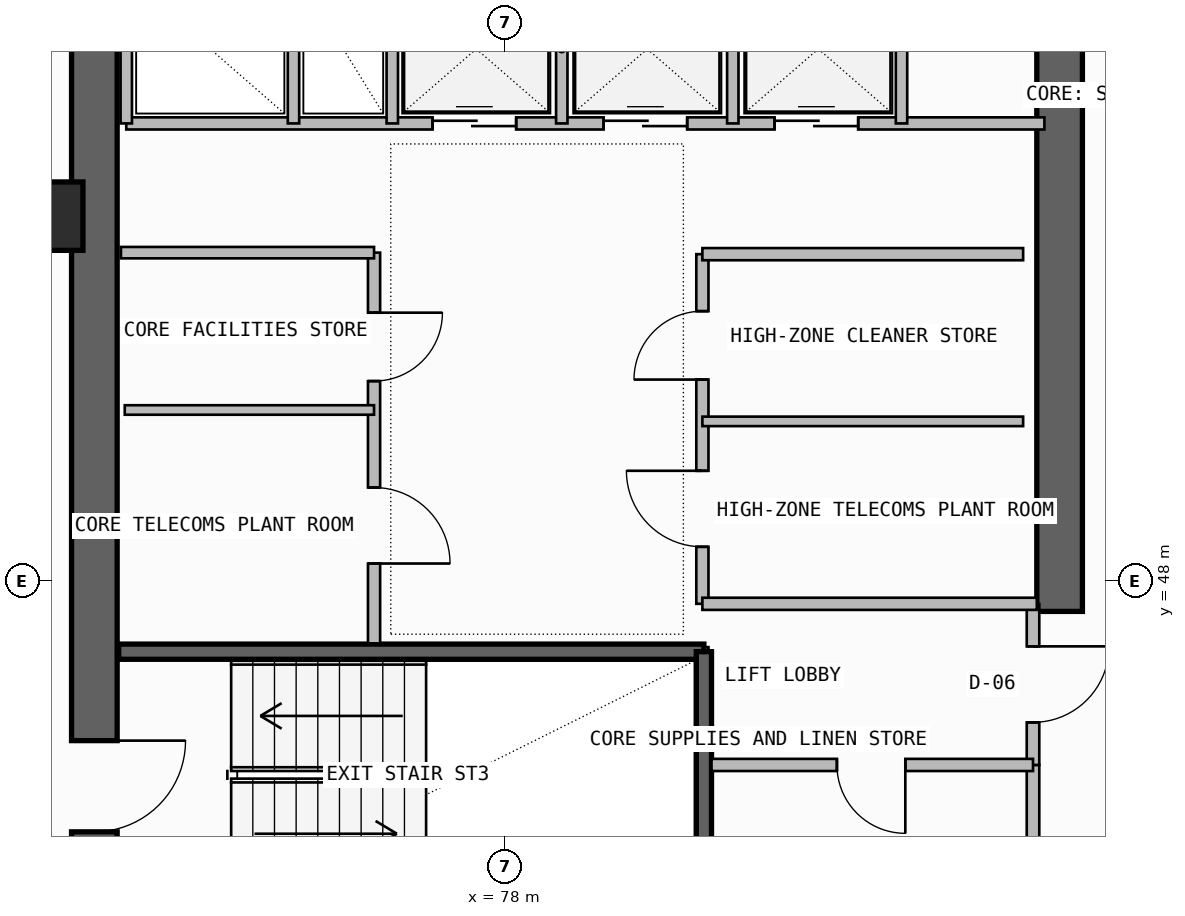
"""IFC4 building model, lengths in metres.
Left out: names, types, materials, properties, quantities, classifications, styles, units other than length and angle.
Written with IfcOpenShell. Run it as: python <this file> out.ifc"""

import sys

from ifc_helpers import new_model, si_unit, direction, frame, frame_2d, origin, origin_2d, place, context, subcontext, project, spatial, rectangle, extrude, element, fill, save


model = new_model("IFC4")
c1 = context("Model", 3, precision=1e-05, world=origin(), true_north=direction((0.0, 1.0)))
c2 = subcontext(c1, "Body", "Model", "MODEL_VIEW")
j1 = project(units=[si_unit("LENGTHUNIT", "METRE"), si_unit("PLANEANGLEUNIT", "RADIAN")], contexts=[c1])
p1 = place(None, origin())
s1 = spatial("IfcSite", under=j1, at=p1, CompositionType="ELEMENT")
p2 = place(p1, origin())
s2 = spatial("IfcBuilding", under=s1, at=p2, CompositionType="ELEMENT")
p3 = place(p2, frame((0.0, 0.0, 243.14)))
s3 = spatial("IfcBuildingStorey", under=s2, at=p3, CompositionType="ELEMENT", Elevation=243.14)
p4 = place(p3, frame((72.6, 43.35, -0.26), z_axis=(0.0, 0.0, 1.0), x_axis=(0.0, 1.0, 0.0)))
e1 = element("IfcWall", 1, at=p4, inside=s3, PredefinedType="SHEAR", context=c2, shape_type="SweptSolid", body=[
    extrude(rectangle(XDim=12.7, YDim=0.6, at=frame_2d((6.35, 0.0))), origin(), (0.0, 0.0, 1.0), 3.52),
])
p5 = place(p4, frame((1.35, 0.0, 0.26)))
e2 = element("IfcOpeningElement", 2, at=p5, cuts=e1, PredefinedType="OPENING", context=c2, shape_type="SweptSolid", body=[
    extrude(rectangle(XDim=1.2, YDim=2.2, at=frame_2d((0.6, 1.1))), frame((0.0, 0.31, 0.0), z_axis=(0.0, -1.0, 0.0), x_axis=(1.0, 0.0, 0.0)), (0.0, 0.0, 1.0), 0.62),
])
p6 = place(p3, frame((85.3, 47.6, -0.26), z_axis=(0.0, 0.0, 1.0), x_axis=(0.0, 1.0, 0.0)))
e3 = element("IfcWall", 3, at=p6, inside=s3, PredefinedType="SHEAR", context=c2, shape_type="SweptSolid", body=[
    extrude(rectangle(XDim=8.45, YDim=0.6, at=frame_2d((4.225, 0.0))), origin(), (0.0, 0.0, 1.0), 3.52),
])
p7 = place(p3, frame((72.0, 52.8, 0.0), z_axis=(0.0, 0.0, 1.0), x_axis=(1.0, 0.0, 0.0)))
e4 = element("IfcColumn", 4, at=p7, inside=s3, PredefinedType="COLUMN", context=c2, shape_type="SweptSolid", body=[
    extrude(rectangle(XDim=0.9, YDim=0.9, at=origin_2d()), origin(), (0.0, 0.0, 1.0), 3.52),
])
p8 = place(p3, frame((72.92, 47.07, -0.26), z_axis=(0.0, 0.0, 1.0), x_axis=(1.0, 0.0, 0.0)))
e5 = element("IfcWall", 5, at=p8, inside=s3, PredefinedType="SOLIDWALL", context=c2, shape_type="SweptSolid", body=[
    extrude(rectangle(XDim=7.7, YDim=0.2, at=frame_2d((3.85, 0.0))), origin(), (0.0, 0.0, 1.0), 3.52),
])
p9 = place(p3, frame((80.62, 43.83, -0.26), z_axis=(0.0, 0.0, 1.0), x_axis=(0.0, 1.0, 0.0)))
e6 = element("IfcWall", 6, at=p9, inside=s3, PredefinedType="SOLIDWALL", context=c2, shape_type="SweptSolid", body=[
    extrude(rectangle(XDim=3.24, YDim=0.2, at=frame_2d((1.62, 0.0))), origin(), (0.0, 0.0, 1.0), 3.52),
])
p10 = place(p3, frame((84.95, 43.68, 0.0), z_axis=(0.0, 0.0, 1.0), x_axis=(0.0, 1.0, 0.0)))
e7 = element("IfcWall", 7, at=p10, inside=s3, PredefinedType="PLUMBINGWALL", context=c2, shape_type="SweptSolid", body=[
    extrude(rectangle(XDim=1.9, YDim=0.165, at=frame_2d((0.95, 0.0))), origin(), (0.0, 0.0, 1.0), 3.26),
])
p11 = place(p3, frame((84.95, 45.58, 0.0), z_axis=(0.0, 0.0, 1.0), x_axis=(0.0, 1.0, 0.0)))
e8 = element("IfcWall", 8, at=p11, inside=s3, PredefinedType="PARTITIONING", context=c2, shape_type="SweptSolid", body=[
    extrude(rectangle(XDim=2.12, YDim=0.165, at=frame_2d((1.06, 0.0))), origin(), (0.0, 0.0, 1.0), 3.26),
])
p12 = place(p11, frame((0.56, 0.0, 0.0)))
e9 = element("IfcOpeningElement", 9, at=p12, cuts=e8, PredefinedType="OPENING", context=c2, shape_type="SweptSolid", body=[
    extrude(rectangle(XDim=1.0, YDim=2.2, at=frame_2d((0.5, 1.1))), frame((0.0, 0.093, 0.0), z_axis=(0.0, -1.0, 0.0), x_axis=(1.0, 0.0, 0.0)), (0.0, 0.0, 1.0), 0.185),
])
p13 = place(p3, frame((80.72, 45.58, 0.0), z_axis=(0.0, 0.0, 1.0), x_axis=(1.0, 0.0, 0.0)))
e10 = element("IfcWall", 10, at=p13, inside=s3, PredefinedType="PLUMBINGWALL", context=c2, shape_type="SweptSolid", body=[
    extrude(rectangle(XDim=4.23, YDim=0.16, at=frame_2d((2.115, 0.0))), origin(), (0.0, 0.0, 1.0), 3.26),
])
p14 = place(p13, frame((1.65, 0.0, 0.0)))
e11 = element("IfcOpeningElement", 11, at=p14, cuts=e10, PredefinedType="OPENING", context=c2, shape_type="SweptSolid", body=[
    extrude(rectangle(XDim=0.9, YDim=2.1, at=frame_2d((0.45, 1.05))), frame((0.0, 0.09, 0.0), z_axis=(0.0, -1.0, 0.0), x_axis=(1.0, 0.0, 0.0)), (0.0, 0.0, 1.0), 0.18),
])
p15 = place(p3, frame((76.28, 47.18, 0.0), z_axis=(0.0, 0.0, 1.0), x_axis=(0.0, 1.0, 0.0)))
e12 = element("IfcWall", 12, at=p15, inside=s3, PredefinedType="SOLIDWALL", context=c2, shape_type="SweptSolid", body=[
    extrude(rectangle(XDim=5.14, YDim=0.16, at=frame_2d((2.57, 0.0))), origin(), (0.0, 0.0, 1.0), 3.26),
])
p16 = place(p15, frame((1.05, 0.0, 0.0)))
e13 = element("IfcOpeningElement", 13, at=p16, cuts=e12, PredefinedType="OPENING", context=c2, shape_type="SweptSolid", body=[
    extrude(rectangle(XDim=1.0, YDim=2.2, at=frame_2d((0.5, 1.1))), frame((0.0, 0.09, 0.0), z_axis=(0.0, -1.0, 0.0), x_axis=(1.0, 0.0, 0.0)), (0.0, 0.0, 1.0), 0.18),
])
p17 = place(p15, frame((3.45, 0.0, 0.0)))
e14 = element("IfcOpeningElement", 14, at=p17, cuts=e12, PredefinedType="OPENING", context=c2, shape_type="SweptSolid", body=[
    extrude(rectangle(XDim=0.9, YDim=2.1, at=frame_2d((0.45, 1.05))), frame((0.0, 0.09, 0.0), z_axis=(0.0, -1.0, 0.0), x_axis=(1.0, 0.0, 0.0)), (0.0, 0.0, 1.0), 0.18),
])
p18 = place(p3, frame((72.95, 52.32, 0.0), z_axis=(0.0, 0.0, 1.0), x_axis=(1.0, 0.0, 0.0)))
e15 = element("IfcWall", 15, at=p18, inside=s3, PredefinedType="SOLIDWALL", context=c2, shape_type="SweptSolid", body=[
    extrude(rectangle(XDim=3.33, YDim=0.15, at=frame_2d((1.665, 0.0))), origin(), (0.0, 0.0, 1.0), 3.26),
])
p19 = place(p3, frame((73.0, 50.25, 0.0), z_axis=(0.0, 0.0, 1.0), x_axis=(1.0, 0.0, 0.0)))
e16 = element("IfcWall", 16, at=p19, inside=s3, PredefinedType="PARTITIONING", context=c2, shape_type="SweptSolid", body=[
    extrude(rectangle(XDim=3.28, YDim=0.125, at=frame_2d((1.64, 0.0))), origin(), (0.0, 0.0, 1.0), 3.26),
])
p20 = place(p3, frame((80.6, 47.7, 0.0), z_axis=(0.0, 0.0, 1.0), x_axis=(0.0, 1.0, 0.0)))
e17 = element("IfcWall", 17, at=p20, inside=s3, PredefinedType="SOLIDWALL", context=c2, shape_type="SweptSolid", body=[
    extrude(rectangle(XDim=4.6, YDim=0.16, at=frame_2d((2.3, 0.0))), origin(), (0.0, 0.0, 1.0), 3.26),
])
p21 = place(p20, frame((0.75, 0.0, 0.0)))
e18 = element("IfcOpeningElement", 18, at=p21, cuts=e17, PredefinedType="OPENING", context=c2, shape_type="SweptSolid", body=[
    extrude(rectangle(XDim=1.0, YDim=2.2, at=frame_2d((0.5, 1.1))), frame((0.0, 0.09, 0.0), z_axis=(0.0, -1.0, 0.0), x_axis=(1.0, 0.0, 0.0)), (0.0, 0.0, 1.0), 0.18),
])
p22 = place(p20, frame((2.95, 0.0, 0.0)))
e19 = element("IfcOpeningElement", 19, at=p22, cuts=e17, PredefinedType="OPENING", context=c2, shape_type="SweptSolid", body=[
    extrude(rectangle(XDim=0.9, YDim=2.1, at=frame_2d((0.45, 1.05))), frame((0.0, 0.09, 0.0), z_axis=(0.0, -1.0, 0.0), x_axis=(1.0, 0.0, 0.0)), (0.0, 0.0, 1.0), 0.18),
])
p23 = place(p3, frame((80.6, 47.7, 0.0), z_axis=(0.0, 0.0, 1.0), x_axis=(1.0, 0.0, 0.0)))
e20 = element("IfcWall", 20, at=p23, inside=s3, PredefinedType="SOLIDWALL", context=c2, shape_type="SweptSolid", body=[
    extrude(rectangle(XDim=4.4, YDim=0.16, at=frame_2d((2.2, 0.0))), origin(), (0.0, 0.0, 1.0), 3.26),
])
p24 = place(p3, frame((80.6, 52.3, 0.0), z_axis=(0.0, 0.0, 1.0), x_axis=(1.0, 0.0, 0.0)))
e21 = element("IfcWall", 21, at=p24, inside=s3, PredefinedType="SOLIDWALL", context=c2, shape_type="SweptSolid", body=[
    extrude(rectangle(XDim=4.22, YDim=0.16, at=frame_2d((2.11, 0.0))), origin(), (0.0, 0.0, 1.0), 3.26),
])
p25 = place(p3, frame((80.6, 50.1, 0.0), z_axis=(0.0, 0.0, 1.0), x_axis=(1.0, 0.0, 0.0)))
e22 = element("IfcWall", 22, at=p25, inside=s3, PredefinedType="PARTITIONING", context=c2, shape_type="SweptSolid", body=[
    extrude(rectangle(XDim=4.22, YDim=0.125, at=frame_2d((2.11, 0.0))), origin(), (0.0, 0.0, 1.0), 3.26),
])
p26 = place(p3, frame((73.02, 54.02, 0.0), z_axis=(0.0, 0.0, 1.0), x_axis=(1.0, 0.0, 0.0)))
e23 = element("IfcWall", 23, at=p26, inside=s3, PredefinedType="SOLIDWALL", context=c2, shape_type="SweptSolid", body=[
    extrude(rectangle(XDim=12.08, YDim=0.16, at=frame_2d((6.04, 0.0))), origin(), (0.0, 0.0, 1.0), 3.26),
])
p27 = place(p26, frame((4.03, 0.0, 0.0)))
e24 = element("IfcOpeningElement", 24, at=p27, cuts=e23, PredefinedType="OPENING", context=c2, shape_type="SweptSolid", body=[
    extrude(rectangle(XDim=1.1, YDim=2.25, at=frame_2d((0.55, 1.125))), frame((0.0, 0.09, 0.0), z_axis=(0.0, -1.0, 0.0), x_axis=(1.0, 0.0, 0.0)), (0.0, 0.0, 1.0), 0.18),
])
p28 = place(p26, frame((6.28, 0.0, 0.0)))
e25 = element("IfcOpeningElement", 25, at=p28, cuts=e23, PredefinedType="OPENING", context=c2, shape_type="SweptSolid", body=[
    extrude(rectangle(XDim=1.1, YDim=2.25, at=frame_2d((0.55, 1.125))), frame((0.0, 0.09, 0.0), z_axis=(0.0, -1.0, 0.0), x_axis=(1.0, 0.0, 0.0)), (0.0, 0.0, 1.0), 0.18),
])
p29 = place(p26, frame((8.53, 0.0, 0.0)))
e26 = element("IfcOpeningElement", 26, at=p29, cuts=e23, PredefinedType="OPENING", context=c2, shape_type="SweptSolid", body=[
    extrude(rectangle(XDim=1.1, YDim=2.25, at=frame_2d((0.55, 1.125))), frame((0.0, 0.09, 0.0), z_axis=(0.0, -1.0, 0.0), x_axis=(1.0, 0.0, 0.0)), (0.0, 0.0, 1.0), 0.18),
])
p30 = place(p3, frame((73.02, 54.02, 0.0), z_axis=(0.0, 0.0, 1.0), x_axis=(0.0, 1.0, 0.0)))
e27 = element("IfcWall", 27, at=p30, inside=s3, PredefinedType="PLUMBINGWALL", context=c2, shape_type="SweptSolid", body=[
    extrude(rectangle(XDim=1.94, YDim=0.15, at=frame_2d((0.97, 0.0))), origin(), (0.0, 0.0, 1.0), 3.26),
])
p31 = place(p3, frame((76.52, 54.02, 0.0), z_axis=(0.0, 0.0, 1.0), x_axis=(0.0, 1.0, 0.0)))
e28 = element("IfcWall", 28, at=p31, inside=s3, PredefinedType="SOLIDWALL", context=c2, shape_type="SweptSolid", body=[
    extrude(rectangle(XDim=1.94, YDim=0.15, at=frame_2d((0.97, 0.0))), origin(), (0.0, 0.0, 1.0), 3.26),
])
p32 = place(p3, frame((75.22, 54.02, 0.0), z_axis=(0.0, 0.0, 1.0), x_axis=(0.0, 1.0, 0.0)))
e29 = element("IfcWall", 29, at=p32, inside=s3, PredefinedType="PLUMBINGWALL", context=c2, shape_type="SweptSolid", body=[
    extrude(rectangle(XDim=1.94, YDim=0.15, at=frame_2d((0.97, 0.0))), origin(), (0.0, 0.0, 1.0), 3.26),
])
for number, where, z_axis, x_axis in (
    (30, (78.75, 54.02, 0.0), (0.0, 0.0, 1.0), (0.0, 1.0, 0.0)),
    (31, (81.0, 54.02, 0.0), (0.0, 0.0, 1.0), (0.0, 1.0, 0.0)),
):
    element("IfcWall", number, at=place(p3, frame(where, z_axis=z_axis, x_axis=x_axis)), inside=s3, PredefinedType="PLUMBINGWALL", context=c2, shape_type="SweptSolid", body=[
        extrude(rectangle(XDim=1.96, YDim=0.15, at=frame_2d((0.98, 0.0))), origin(), (0.0, 0.0, 1.0), 3.26),
    ])
p33 = place(p3, frame((83.22, 54.02, 0.0), z_axis=(0.0, 0.0, 1.0), x_axis=(0.0, 1.0, 0.0)))
e32 = element("IfcWall", 32, at=p33, inside=s3, PredefinedType="SOLIDWALL", context=c2, shape_type="SweptSolid", body=[
    extrude(rectangle(XDim=1.96, YDim=0.15, at=frame_2d((0.98, 0.0))), origin(), (0.0, 0.0, 1.0), 3.26),
])
p34 = place(p5, frame((1.2, 0.0, 0.0), z_axis=(0.0, 0.0, 1.0), x_axis=(-1.0, 0.0, 0.0)))
e33 = element("IfcDoor", 33, at=p34, inside=s3, OperationType="SINGLE_SWING_LEFT", PredefinedType="USERDEFINED", context=c2, shape_type="SweptSolid", body=[
    extrude(rectangle(XDim=1.2, YDim=2.2, at=frame_2d((0.6, 1.1))), frame((0.0, 0.025, 0.0), z_axis=(0.0, -1.0, 0.0), x_axis=(1.0, 0.0, 0.0)), (0.0, 0.0, 1.0), 0.05),
])
fill(e2, e33)
p35 = place(p12, frame((1.0, 0.0, 0.0), z_axis=(0.0, 0.0, 1.0), x_axis=(-1.0, 0.0, 0.0)))
e34 = element("IfcDoor", 34, at=p35, inside=s3, OperationType="SINGLE_SWING_LEFT", PredefinedType="DOOR", context=c2, shape_type="SweptSolid", body=[
    extrude(rectangle(XDim=1.0, YDim=2.2, at=frame_2d((0.5, 1.1))), frame((0.0, 0.025, 0.0), z_axis=(0.0, -1.0, 0.0), x_axis=(1.0, 0.0, 0.0)), (0.0, 0.0, 1.0), 0.05),
])
fill(e9, e34)
p36 = place(p14, frame((0.9, 0.0, 0.0), z_axis=(0.0, 0.0, 1.0), x_axis=(-1.0, 0.0, 0.0)))
e35 = element("IfcDoor", 35, at=p36, inside=s3, OperationType="SINGLE_SWING_LEFT", PredefinedType="DOOR", context=c2, shape_type="SweptSolid", body=[
    extrude(rectangle(XDim=0.9, YDim=2.1, at=frame_2d((0.45, 1.05))), frame((0.0, 0.025, 0.0), z_axis=(0.0, -1.0, 0.0), x_axis=(1.0, 0.0, 0.0)), (0.0, 0.0, 1.0), 0.05),
])
fill(e11, e35)
p37 = place(p16, frame((1.0, 0.0, 0.0), z_axis=(0.0, 0.0, 1.0), x_axis=(-1.0, 0.0, 0.0)))
e36 = element("IfcDoor", 36, at=p37, inside=s3, OperationType="SINGLE_SWING_RIGHT", PredefinedType="DOOR", context=c2, shape_type="SweptSolid", body=[
    extrude(rectangle(XDim=1.0, YDim=2.2, at=frame_2d((0.5, 1.1))), frame((0.0, 0.025, 0.0), z_axis=(0.0, -1.0, 0.0), x_axis=(1.0, 0.0, 0.0)), (0.0, 0.0, 1.0), 0.05),
])
fill(e13, e36)
p38 = place(p17, frame((0.9, 0.0, 0.0), z_axis=(0.0, 0.0, 1.0), x_axis=(-1.0, 0.0, 0.0)))
e37 = element("IfcDoor", 37, at=p38, inside=s3, OperationType="SINGLE_SWING_LEFT", PredefinedType="DOOR", context=c2, shape_type="SweptSolid", body=[
    extrude(rectangle(XDim=0.9, YDim=2.1, at=frame_2d((0.45, 1.05))), frame((0.0, 0.025, 0.0), z_axis=(0.0, -1.0, 0.0), x_axis=(1.0, 0.0, 0.0)), (0.0, 0.0, 1.0), 0.05),
])
fill(e14, e37)
p39 = place(p21, origin())
e38 = element("IfcDoor", 38, at=p39, inside=s3, OperationType="SINGLE_SWING_RIGHT", PredefinedType="DOOR", context=c2, shape_type="SweptSolid", body=[
    extrude(rectangle(XDim=1.0, YDim=2.2, at=frame_2d((0.5, 1.1))), frame((0.0, 0.025, 0.0), z_axis=(0.0, -1.0, 0.0), x_axis=(1.0, 0.0, 0.0)), (0.0, 0.0, 1.0), 0.05),
])
fill(e18, e38)
p40 = place(p22, origin())
e39 = element("IfcDoor", 39, at=p40, inside=s3, OperationType="SINGLE_SWING_LEFT", PredefinedType="DOOR", context=c2, shape_type="SweptSolid", body=[
    extrude(rectangle(XDim=0.9, YDim=2.1, at=frame_2d((0.45, 1.05))), frame((0.0, 0.025, 0.0), z_axis=(0.0, -1.0, 0.0), x_axis=(1.0, 0.0, 0.0)), (0.0, 0.0, 1.0), 0.05),
])
fill(e19, e39)
p41 = place(p27, origin())
e40 = element("IfcDoor", 40, at=p41, inside=s3, OperationType="DOUBLE_DOOR_SLIDING", PredefinedType="DOOR", context=c2, shape_type="SweptSolid", body=[
    extrude(rectangle(XDim=1.1, YDim=2.25, at=frame_2d((0.55, 1.125))), frame((0.0, 0.025, 0.0), z_axis=(0.0, -1.0, 0.0), x_axis=(1.0, 0.0, 0.0)), (0.0, 0.0, 1.0), 0.05),
])
fill(e24, e40)
p42 = place(p28, origin())
e41 = element("IfcDoor", 41, at=p42, inside=s3, OperationType="DOUBLE_DOOR_SLIDING", PredefinedType="DOOR", context=c2, shape_type="SweptSolid", body=[
    extrude(rectangle(XDim=1.1, YDim=2.25, at=frame_2d((0.55, 1.125))), frame((0.0, 0.025, 0.0), z_axis=(0.0, -1.0, 0.0), x_axis=(1.0, 0.0, 0.0)), (0.0, 0.0, 1.0), 0.05),
])
fill(e25, e41)
p43 = place(p29, origin())
e42 = element("IfcDoor", 42, at=p43, inside=s3, OperationType="DOUBLE_DOOR_SLIDING", PredefinedType="DOOR", context=c2, shape_type="SweptSolid", body=[
    extrude(rectangle(XDim=1.1, YDim=2.25, at=frame_2d((0.55, 1.125))), frame((0.0, 0.025, 0.0), z_axis=(0.0, -1.0, 0.0), x_axis=(1.0, 0.0, 0.0)), (0.0, 0.0, 1.0), 0.05),
])
fill(e26, e42)
save(model, sys.argv[1])
